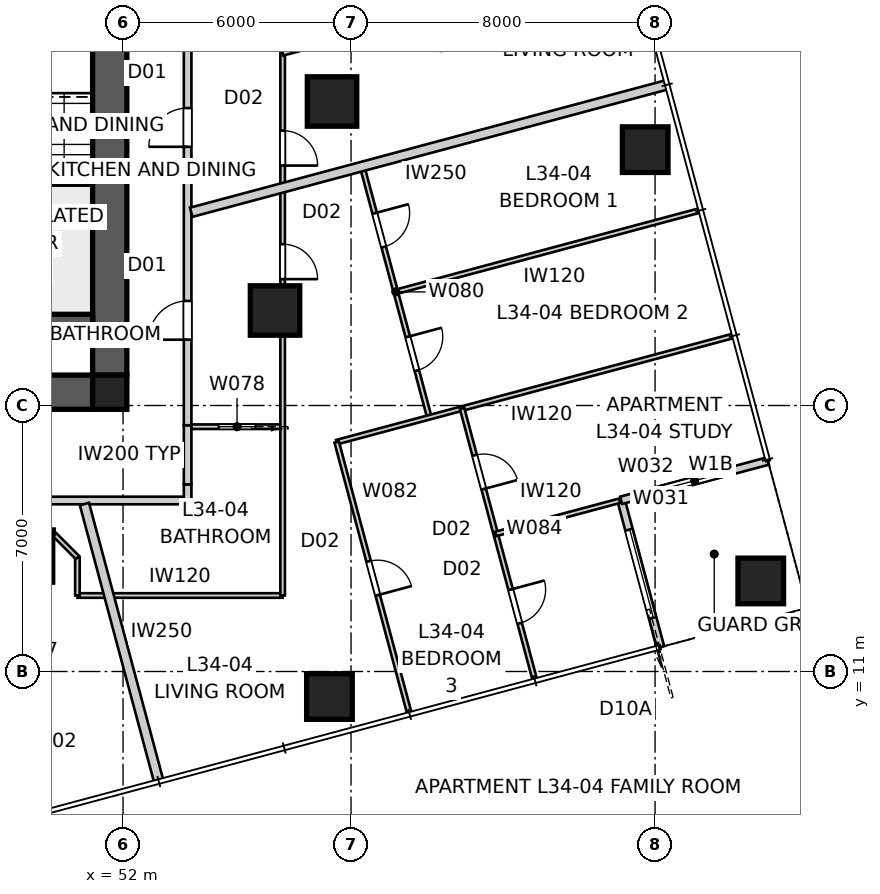
"""IFC4 building model, lengths in metres.
Left out: names, types, materials, properties, quantities, classifications, styles, units other than length and angle.
Written with IfcOpenShell. Run it as: python <this file> out.ifc"""

import sys

from ifc_helpers import new_model, si_unit, direction, frame, frame_2d, origin, origin_2d, place, context, subcontext, project, spatial, polyline, rectangle, outline, extrude, element, fill, save


model = new_model("IFC4")
c1 = context("Model", 3, precision=1e-05, world=origin(), true_north=direction((0.0, 1.0)))
c2 = subcontext(c1, "Body", "Model", "MODEL_VIEW")
j1 = project(units=[si_unit("LENGTHUNIT", "METRE"), si_unit("PLANEANGLEUNIT", "RADIAN")], contexts=[c1])
p1 = place(None, origin())
s1 = spatial("IfcSite", under=j1, at=p1, CompositionType="ELEMENT")
p2 = place(p1, origin())
s2 = spatial("IfcBuilding", under=s1, at=p2, CompositionType="ELEMENT")
p3 = place(p2, frame((0.0, 0.0, 125.2)))
s3 = spatial("IfcBuildingStorey", under=s2, at=p3, CompositionType="ELEMENT", Elevation=125.2)
p4 = place(p3, frame((51.2, 18.35, 0.0), z_axis=(0.0, 0.0, 1.0), x_axis=(-1.0, 0.0, 0.0)))
e1 = element("IfcWall", 1, at=p4, inside=s3, PredefinedType="SHEAR", context=c2, shape_type="SweptSolid", body=[
    extrude(outline(polyline([(0.0, -0.45), (22.4, -0.45), (22.4, -0.025), (22.85, -0.025), (22.85, 0.025), (22.4, 0.025), (22.4, 0.45), (0.0, 0.45), (0.0, 0.025), (-0.45, 0.025), (-0.45, -0.025), (0.0, -0.025), (0.0, -0.45)])), origin(), (0.0, 0.0, 1.0), 3.4),
])
p5 = place(p3, frame((51.65, 18.8, 0.0), z_axis=(0.0, 0.0, 1.0), x_axis=(0.0, 1.0, 0.0)))
e2 = element("IfcWall", 2, at=p5, inside=s3, PredefinedType="SHEAR", context=c2, shape_type="SweptSolid", body=[
    extrude(outline(polyline([(0.0, -0.45), (22.4, -0.45), (22.4, -0.025), (22.85, -0.025), (22.85, 0.025), (22.4, 0.025), (22.4, 0.45), (0.0, 0.45), (0.0, 0.025), (-0.45, 0.025), (-0.45, -0.025), (0.0, -0.025), (0.0, -0.45)])), origin(), (0.0, 0.0, 1.0), 3.4),
])
p6 = place(p5, frame((11.14, 0.0, 0.0)))
e3 = element("IfcOpeningElement", 3, at=p6, cuts=e2, PredefinedType="OPENING", context=c2, shape_type="SweptSolid", body=[
    extrude(rectangle(XDim=1.02, YDim=2.4, at=frame_2d((0.51, 1.2))), frame((0.0, 0.46, 0.0), z_axis=(0.0, -1.0, 0.0), x_axis=(1.0, 0.0, 0.0)), (0.0, 0.0, 1.0), 0.92),
])
p7 = place(p3, frame((51.2, 20.25, 0.0), z_axis=(0.0, 0.0, 1.0), x_axis=(-1.0, 0.0, 0.0)))
e4 = element("IfcWall", 4, at=p7, inside=s3, PredefinedType="SHEAR", context=c2, shape_type="SweptSolid", body=[
    extrude(rectangle(XDim=3.5, YDim=0.3, at=frame_2d((1.75, 0.0))), origin(), (0.0, 0.0, 1.0), 3.4),
])
p8 = place(p3, frame((51.65, 18.35, 0.0), z_axis=(0.0, 0.0, 1.0), x_axis=(1.0, 0.0, 0.0)))
e5 = element("IfcColumn", 5, at=p8, inside=s3, PredefinedType="COLUMN", context=c2, shape_type="SweptSolid", body=[
    extrude(rectangle(XDim=0.9, YDim=0.9, at=origin_2d()), origin(), (0.0, 0.0, 1.0), 3.4),
])
for number, where, z_axis, x_axis in (
    (6, (57.432, 10.342, 0.0), (0.0, 0.0, 1.0), (1.0, 0.0, 0.0)),
    (7, (68.781, 13.383, 0.0), (0.0, 0.0, 1.0), (1.0, 0.0, 0.0)),
    (8, (65.74, 24.733, 0.0), (0.0, 0.0, 1.0), (1.0, 0.0, 0.0)),
):
    element("IfcColumn", number, at=place(p3, frame(where, z_axis=z_axis, x_axis=x_axis)), inside=s3, PredefinedType="COLUMN", context=c2, shape_type="SweptSolid", body=[
        extrude(rectangle(XDim=1.2, YDim=1.2, at=origin_2d()), origin(), (0.0, 0.0, 1.0), 3.4),
    ])
for number, where, z_axis, x_axis in (
    (9, (57.5, 26.0, 0.0), (0.0, 0.0, 1.0), (1.0, 0.0, 0.0)),
    (10, (49.5, 14.0, 0.0), (0.0, 0.0, 1.0), (1.0, 0.0, 0.0)),
    (11, (56.0, 20.5, 0.0), (0.0, 0.0, 1.0), (1.0, 0.0, 0.0)),
):
    element("IfcColumn", number, at=place(p3, frame(where, z_axis=z_axis, x_axis=x_axis)), inside=s3, PredefinedType="COLUMN", context=c2, shape_type="SweptSolid", body=[
        extrude(rectangle(XDim=1.3, YDim=1.3, at=origin_2d()), origin(), (0.0, 0.0, 1.0), 3.4),
    ])
p9 = place(p3, frame((66.143, 11.641, 0.0), z_axis=(0.0, 0.0, 1.0), x_axis=(-0.258843877716, 0.965919172068, 0.0)))
e12 = element("IfcWall", 12, at=p9, inside=s3, PredefinedType="SOLIDWALL", context=c2, shape_type="SweptSolid", body=[
    extrude(rectangle(XDim=4.0, YDim=0.2, at=frame_2d((2.0, 0.0))), origin(), (0.0, 0.0, 1.0), 3.25),
])
p10 = place(p9, frame((0.8, 0.0, 0.0)))
e13 = element("IfcOpeningElement", 13, at=p10, cuts=e12, PredefinedType="OPENING", context=c2, shape_type="SweptSolid", body=[
    extrude(rectangle(XDim=2.4, YDim=2.1, at=frame_2d((1.2, 1.05))), frame((0.0, 0.11, 0.0), z_axis=(0.0, -1.0, 0.0), x_axis=(1.0, 0.0, 0.0)), (0.0, 0.0, 1.0), 0.22),
])
p11 = place(p3, frame((65.107, 15.504, 0.0), z_axis=(0.0, 0.0, 1.0), x_axis=(0.965934430412, 0.258786931944, 0.0)))
e14 = element("IfcWall", 14, at=p11, inside=s3, PredefinedType="SOLIDWALL", context=c2, shape_type="SweptSolid", body=[
    extrude(rectangle(XDim=4.0, YDim=0.2, at=frame_2d((2.0, 0.0))), origin(), (0.0, 0.0, 1.0), 3.25),
])
p12 = place(p11, frame((1.0, 0.0, 0.45)))
e15 = element("IfcOpeningElement", 15, at=p12, cuts=e14, PredefinedType="OPENING", context=c2, shape_type="SweptSolid", body=[
    extrude(rectangle(XDim=2.0, YDim=1.8, at=frame_2d((1.0, 0.9))), frame((0.0, 0.11, 0.0), z_axis=(0.0, -1.0, 0.0), x_axis=(1.0, 0.0, 0.0)), (0.0, 0.0, 1.0), 0.22),
])
p13 = place(p3, frame((25.5, 15.5, 0.0), z_axis=(0.0, 0.0, 1.0), x_axis=(1.0, 0.0, 0.0)))
e16 = element("IfcWall", 16, at=p13, inside=s3, PredefinedType="PARTITIONING", context=c2, shape_type="SweptSolid", body=[
    extrude(rectangle(XDim=28.2, YDim=0.2, at=frame_2d((14.1, 0.0))), origin(), (0.0, 0.0, 1.0), 3.25),
])
p14 = place(p13, frame((2.244, 0.0, 0.0)))
e17 = element("IfcOpeningElement", 17, at=p14, cuts=e16, PredefinedType="OPENING", context=c2, shape_type="SweptSolid", body=[
    extrude(rectangle(XDim=1.02, YDim=2.1, at=frame_2d((0.51, 1.05))), frame((0.0, 0.11, 0.0), z_axis=(0.0, -1.0, 0.0), x_axis=(1.0, 0.0, 0.0)), (0.0, 0.0, 1.0), 0.22),
])
p15 = place(p13, frame((9.542, 0.0, 0.0)))
e18 = element("IfcOpeningElement", 18, at=p15, cuts=e16, PredefinedType="OPENING", context=c2, shape_type="SweptSolid", body=[
    extrude(rectangle(XDim=1.02, YDim=2.34, at=frame_2d((0.51, 1.17))), frame((0.0, 0.11, 0.0), z_axis=(0.0, -1.0, 0.0), x_axis=(1.0, 0.0, 0.0)), (0.0, 0.0, 1.0), 0.22),
])
p16 = place(p13, frame((21.994, 0.0, 0.0)))
e19 = element("IfcOpeningElement", 19, at=p16, cuts=e16, PredefinedType="OPENING", context=c2, shape_type="SweptSolid", body=[
    extrude(rectangle(XDim=1.02, YDim=2.34, at=frame_2d((0.51, 1.17))), frame((0.0, 0.11, 0.0), z_axis=(0.0, -1.0, 0.0), x_axis=(1.0, 0.0, 0.0)), (0.0, 0.0, 1.0), 0.22),
])
p17 = place(p3, frame((53.7, 15.5, 0.0), z_axis=(0.0, 0.0, 1.0), x_axis=(0.0, 1.0, 0.0)))
e20 = element("IfcWall", 20, at=p17, inside=s3, PredefinedType="PARTITIONING", context=c2, shape_type="SweptSolid", body=[
    extrude(rectangle(XDim=0.426, YDim=0.2, at=frame_2d((0.213, 0.0))), origin(), (0.0, 0.0, 1.0), 3.25),
])
p18 = place(p3, frame((53.7, 15.926, 0.0), z_axis=(0.0, 0.0, 1.0), x_axis=(0.0, 1.0, 0.0)))
e21 = element("IfcWall", 21, at=p18, inside=s3, PredefinedType="PARTITIONING", context=c2, shape_type="SweptSolid", body=[
    extrude(rectangle(XDim=1.554, YDim=0.2, at=frame_2d((0.777, 0.0))), origin(), (0.0, 0.0, 1.0), 2.722),
])
p19 = place(p3, frame((53.7, 17.48, 0.0), z_axis=(0.0, 0.0, 1.0), x_axis=(0.0, 1.0, 0.0)))
e22 = element("IfcWall", 22, at=p19, inside=s3, PredefinedType="PARTITIONING", context=c2, shape_type="SweptSolid", body=[
    extrude(rectangle(XDim=26.22, YDim=0.2, at=frame_2d((13.11, 0.0))), origin(), (0.0, 0.0, 1.0), 3.25),
])
p20 = place(p19, frame((2.252, 0.0, 0.0)))
e23 = element("IfcOpeningElement", 23, at=p20, cuts=e22, PredefinedType="OPENING", context=c2, shape_type="SweptSolid", body=[
    extrude(rectangle(XDim=1.02, YDim=2.34, at=frame_2d((0.51, 1.17))), frame((0.0, 0.11, 0.0), z_axis=(0.0, -1.0, 0.0), x_axis=(1.0, 0.0, 0.0)), (0.0, 0.0, 1.0), 0.22),
])
p21 = place(p19, frame((7.328, 0.0, 0.0)))
e24 = element("IfcOpeningElement", 24, at=p21, cuts=e22, PredefinedType="OPENING", context=c2, shape_type="SweptSolid", body=[
    extrude(rectangle(XDim=1.02, YDim=2.34, at=frame_2d((0.51, 1.17))), frame((0.0, 0.11, 0.0), z_axis=(0.0, -1.0, 0.0), x_axis=(1.0, 0.0, 0.0)), (0.0, 0.0, 1.0), 0.22),
])
p22 = place(p3, frame((52.942, 8.104, 0.0), z_axis=(0.0, 0.0, 1.0), x_axis=(-0.258822171171, 0.965924988656, 0.0)))
e25 = element("IfcWall", 25, at=p22, inside=s3, PredefinedType="PARTITIONING", context=c2, shape_type="SweptSolid", body=[
    extrude(rectangle(XDim=7.56, YDim=0.25, at=frame_2d((3.78, 0.0))), origin(), (0.0, 0.0, 1.0), 3.25),
])
p23 = place(p3, frame((66.318, 26.44, 0.0), z_axis=(0.0, 0.0, 1.0), x_axis=(-0.965924854576, -0.258822671559, 0.0)))
e26 = element("IfcWall", 26, at=p23, inside=s3, PredefinedType="PARTITIONING", context=c2, shape_type="SweptSolid", body=[
    extrude(rectangle(XDim=12.966, YDim=0.25, at=frame_2d((6.483, 0.0))), origin(), (0.0, 0.0, 1.0), 3.25),
])
p24 = place(p3, frame((56.2, 13.0, 0.0), z_axis=(0.0, 0.0, 1.0), x_axis=(-1.0, 0.0, 0.0)))
e27 = element("IfcWall", 27, at=p24, inside=s3, PredefinedType="PARTITIONING", context=c2, shape_type="SweptSolid", body=[
    extrude(rectangle(XDim=5.4, YDim=0.12, at=frame_2d((2.7, 0.0))), origin(), (0.0, 0.0, 1.0), 3.25),
])
p25 = place(p3, frame((50.8, 13.0, 0.0), z_axis=(0.0, 0.0, 1.0), x_axis=(0.0, 1.0, 0.0)))
e28 = element("IfcWall", 28, at=p25, inside=s3, PredefinedType="PARTITIONING", context=c2, shape_type="SweptSolid", body=[
    extrude(rectangle(XDim=1.0, YDim=0.12, at=frame_2d((0.5, 0.0))), origin(), (0.0, 0.0, 1.0), 3.25),
])
p26 = place(p3, frame((50.8, 14.0, 0.0), z_axis=(0.0, 0.0, 1.0), x_axis=(-0.707106781187, 0.707106781187, 0.0)))
e29 = element("IfcWall", 29, at=p26, inside=s3, PredefinedType="PARTITIONING", context=c2, shape_type="SweptSolid", body=[
    extrude(rectangle(XDim=0.849, YDim=0.12, at=frame_2d((0.424, 0.0))), origin(), (0.0, 0.0, 1.0), 3.25),
])
p27 = place(p3, frame((50.2, 14.7, 0.0), z_axis=(0.0, 0.0, 1.0), x_axis=(-1.0, 0.0, 0.0)))
e30 = element("IfcWall", 30, at=p27, inside=s3, PredefinedType="PARTITIONING", context=c2, shape_type="SweptSolid", body=[
    extrude(rectangle(XDim=1.4, YDim=0.12, at=frame_2d((0.7, 0.0))), origin(), (0.0, 0.0, 1.0), 3.25),
])
p28 = place(p3, frame((56.2, 17.442, 0.0), z_axis=(0.0, 0.0, 1.0), x_axis=(-1.0, 0.0, 0.0)))
e31 = element("IfcWall", 31, at=p28, inside=s3, PredefinedType="PARTITIONING", context=c2, shape_type="SweptSolid", body=[
    extrude(rectangle(XDim=2.4, YDim=0.12, at=frame_2d((1.2, 0.0))), origin(), (0.0, 0.0, 1.0), 3.25),
])
p29 = place(p28, frame((0.72, 0.0, 0.0)))
e32 = element("IfcOpeningElement", 32, at=p29, cuts=e31, PredefinedType="OPENING", context=c2, shape_type="SweptSolid", body=[
    extrude(rectangle(XDim=0.96, YDim=2.1, at=frame_2d((0.48, 1.05))), frame((0.0, 0.07, 0.0), z_axis=(0.0, -1.0, 0.0), x_axis=(1.0, 0.0, 0.0)), (0.0, 0.0, 1.0), 0.14),
])
p30 = place(p3, frame((56.2, 46.2, 0.0), z_axis=(0.0, 0.0, 1.0), x_axis=(0.0, -1.0, 0.0)))
e33 = element("IfcWall", 33, at=p30, inside=s3, PredefinedType="PARTITIONING", context=c2, shape_type="SweptSolid", body=[
    extrude(rectangle(XDim=33.2, YDim=0.12, at=frame_2d((16.6, 0.0))), origin(), (0.0, 0.0, 1.0), 2.55),
])
p31 = place(p30, frame((23.955, 0.0, 0.0)))
e34 = element("IfcOpeningElement", 34, at=p31, cuts=e33, PredefinedType="OPENING", context=c2, shape_type="SweptSolid", body=[
    extrude(rectangle(XDim=0.92, YDim=2.34, at=frame_2d((0.46, 1.17))), frame((0.0, 0.07, 0.0), z_axis=(0.0, -1.0, 0.0), x_axis=(1.0, 0.0, 0.0)), (0.0, 0.0, 1.0), 0.14),
])
p32 = place(p30, frame((20.966, 0.0, 0.0)))
e35 = element("IfcOpeningElement", 35, at=p32, cuts=e33, PredefinedType="OPENING", context=c2, shape_type="SweptSolid", body=[
    extrude(rectangle(XDim=0.92, YDim=2.34, at=frame_2d((0.46, 1.17))), frame((0.0, 0.07, 0.0), z_axis=(0.0, -1.0, 0.0), x_axis=(1.0, 0.0, 0.0)), (0.0, 0.0, 1.0), 0.14),
])
p33 = place(p30, frame((13.174, 0.0, 0.0)))
e36 = element("IfcOpeningElement", 36, at=p33, cuts=e33, PredefinedType="OPENING", context=c2, shape_type="SweptSolid", body=[
    extrude(rectangle(XDim=0.96, YDim=2.1, at=frame_2d((0.48, 1.05))), frame((0.0, 0.07, 0.0), z_axis=(0.0, -1.0, 0.0), x_axis=(1.0, 0.0, 0.0)), (0.0, 0.0, 1.0), 0.14),
])
p34 = place(p3, frame((58.292, 24.29, 0.0), z_axis=(0.0, 0.0, 1.0), x_axis=(0.258809899302, -0.965928276853, 0.0)))
e37 = element("IfcWall", 37, at=p34, inside=s3, PredefinedType="PARTITIONING", context=c2, shape_type="SweptSolid", body=[
    extrude(rectangle(XDim=6.833, YDim=0.12, at=frame_2d((3.417, 0.0))), origin(), (0.0, 0.0, 1.0), 3.25),
])
p35 = place(p34, frame((1.273, 0.0, 0.0)))
e38 = element("IfcOpeningElement", 38, at=p35, cuts=e37, PredefinedType="OPENING", context=c2, shape_type="SweptSolid", body=[
    extrude(rectangle(XDim=0.92, YDim=2.34, at=frame_2d((0.46, 1.17))), frame((0.0, 0.07, 0.0), z_axis=(0.0, -1.0, 0.0), x_axis=(1.0, 0.0, 0.0)), (0.0, 0.0, 1.0), 0.14),
])
p36 = place(p34, frame((4.64, 0.0, 0.0)))
e39 = element("IfcOpeningElement", 39, at=p36, cuts=e37, PredefinedType="OPENING", context=c2, shape_type="SweptSolid", body=[
    extrude(rectangle(XDim=0.92, YDim=2.34, at=frame_2d((0.46, 1.17))), frame((0.0, 0.07, 0.0), z_axis=(0.0, -1.0, 0.0), x_axis=(1.0, 0.0, 0.0)), (0.0, 0.0, 1.0), 0.14),
])
p37 = place(p3, frame((68.048, 19.83, 0.0), z_axis=(0.0, 0.0, 1.0), x_axis=(-0.965921496576, -0.258835203272, 0.0)))
e40 = element("IfcWall", 40, at=p37, inside=s3, PredefinedType="PARTITIONING", context=c2, shape_type="SweptSolid", body=[
    extrude(rectangle(XDim=10.793, YDim=0.12, at=frame_2d((5.397, 0.0))), origin(), (0.0, 0.0, 1.0), 3.25),
])
p38 = place(p3, frame((57.623, 17.036, 0.0), z_axis=(0.0, 0.0, 1.0), x_axis=(0.258816044185, -0.965926630377, 0.0)))
e41 = element("IfcWall", 41, at=p38, inside=s3, PredefinedType="PARTITIONING", context=c2, shape_type="SweptSolid", body=[
    extrude(rectangle(XDim=7.377, YDim=0.12, at=frame_2d((3.688, 0.0))), origin(), (0.0, 0.0, 1.0), 2.638),
])
p39 = place(p38, frame((3.248, 0.0, 0.0)))
e42 = element("IfcOpeningElement", 42, at=p39, cuts=e41, PredefinedType="OPENING", context=c2, shape_type="SweptSolid", body=[
    extrude(rectangle(XDim=0.92, YDim=2.34, at=frame_2d((0.46, 1.17))), frame((0.0, 0.07, 0.0), z_axis=(0.0, -1.0, 0.0), x_axis=(1.0, 0.0, 0.0)), (0.0, 0.0, 1.0), 0.14),
])
p40 = place(p3, frame((67.164, 23.13, 0.0), z_axis=(0.0, 0.0, 1.0), x_axis=(-0.965929470378, -0.258805444794, 0.0)))
e43 = element("IfcWall", 43, at=p40, inside=s3, PredefinedType="PARTITIONING", context=c2, shape_type="SweptSolid", body=[
    extrude(rectangle(XDim=8.269, YDim=0.12, at=frame_2d((4.135, 0.0))), origin(), (0.0, 0.0, 1.0), 2.722),
])
p41 = place(p3, frame((60.923, 17.92, 0.0), z_axis=(0.0, 0.0, 1.0), x_axis=(0.258846923464, -0.965918355874, 0.0)))
e44 = element("IfcWall", 44, at=p41, inside=s3, PredefinedType="PARTITIONING", context=c2, shape_type="SweptSolid", body=[
    extrude(rectangle(XDim=7.377, YDim=0.12, at=frame_2d((3.688, 0.0))), origin(), (0.0, 0.0, 1.0), 3.25),
])
p42 = place(p41, frame((4.932, 0.0, 0.0)))
e45 = element("IfcOpeningElement", 45, at=p42, cuts=e44, PredefinedType="OPENING", context=c2, shape_type="SweptSolid", body=[
    extrude(rectangle(XDim=0.92, YDim=2.34, at=frame_2d((0.46, 1.17))), frame((0.0, 0.07, 0.0), z_axis=(0.0, -1.0, 0.0), x_axis=(1.0, 0.0, 0.0)), (0.0, 0.0, 1.0), 0.14),
])
p43 = place(p41, frame((1.273, 0.0, 0.0)))
e46 = element("IfcOpeningElement", 46, at=p43, cuts=e44, PredefinedType="OPENING", context=c2, shape_type="SweptSolid", body=[
    extrude(rectangle(XDim=0.92, YDim=2.34, at=frame_2d((0.46, 1.17))), frame((0.0, 0.07, 0.0), z_axis=(0.0, -1.0, 0.0), x_axis=(1.0, 0.0, 0.0)), (0.0, 0.0, 1.0), 0.14),
])
p44 = place(p3, frame((65.069, 15.494, 0.0), z_axis=(0.0, 0.0, 1.0), x_axis=(-0.96593546512, -0.258783069815, 0.0)))
e47 = element("IfcWall", 47, at=p44, inside=s3, PredefinedType="PARTITIONING", context=c2, shape_type="SweptSolid", body=[
    extrude(rectangle(XDim=3.376, YDim=0.12, at=frame_2d((1.688, 0.0))), origin(), (0.0, 0.0, 1.0), 3.25),
])
p45 = place(p3, frame((56.2, 27.266, 0.0), z_axis=(0.0, 0.0, 1.0), x_axis=(0.965926072385, 0.25881812666, 0.0)))
e48 = element("IfcWall", 48, at=p45, inside=s3, PredefinedType="PARTITIONING", context=c2, shape_type="SweptSolid", body=[
    extrude(rectangle(XDim=9.52, YDim=0.12, at=frame_2d((4.76, 0.0))), origin(), (0.0, 0.0, 1.0), 3.25),
])
p46 = place(p45, frame((4.32, 0.0, 0.0)))
e49 = element("IfcOpeningElement", 49, at=p46, cuts=e48, PredefinedType="OPENING", context=c2, shape_type="SweptSolid", body=[
    extrude(rectangle(XDim=0.92, YDim=2.34, at=frame_2d((0.46, 1.17))), frame((0.0, 0.07, 0.0), z_axis=(0.0, -1.0, 0.0), x_axis=(1.0, 0.0, 0.0)), (0.0, 0.0, 1.0), 0.14),
])
p47 = place(p10, origin())
e50 = element("IfcDoor", 50, at=p47, inside=s3, OperationType="SLIDING_TO_LEFT", PredefinedType="DOOR", context=c2, shape_type="SweptSolid", body=[
    extrude(rectangle(XDim=2.4, YDim=2.1, at=frame_2d((1.2, 1.05))), frame((0.0, 0.025, 0.0), z_axis=(0.0, -1.0, 0.0), x_axis=(1.0, 0.0, 0.0)), (0.0, 0.0, 1.0), 0.05),
])
fill(e13, e50)
p48 = place(p12, origin())
e51 = element("IfcWindow", 51, at=p48, inside=s3, PartitioningType="SINGLE_PANEL", PredefinedType="WINDOW", context=c2, shape_type="SweptSolid", body=[
    extrude(rectangle(XDim=2.0, YDim=1.8, at=frame_2d((1.0, 0.9))), frame((0.0, 0.03, 0.0), z_axis=(0.0, -1.0, 0.0), x_axis=(1.0, 0.0, 0.0)), (0.0, 0.0, 1.0), 0.06),
])
fill(e15, e51)
p49 = place(p20, origin())
e52 = element("IfcDoor", 52, at=p49, inside=s3, OperationType="SINGLE_SWING_LEFT", PredefinedType="DOOR", context=c2, shape_type="SweptSolid", body=[
    extrude(rectangle(XDim=1.02, YDim=2.34, at=frame_2d((0.51, 1.17))), frame((0.0, 0.025, 0.0), z_axis=(0.0, -1.0, 0.0), x_axis=(1.0, 0.0, 0.0)), (0.0, 0.0, 1.0), 0.05),
])
fill(e23, e52)
p50 = place(p21, origin())
e53 = element("IfcDoor", 53, at=p50, inside=s3, OperationType="SINGLE_SWING_LEFT", PredefinedType="DOOR", context=c2, shape_type="SweptSolid", body=[
    extrude(rectangle(XDim=1.02, YDim=2.34, at=frame_2d((0.51, 1.17))), frame((0.0, 0.025, 0.0), z_axis=(0.0, -1.0, 0.0), x_axis=(1.0, 0.0, 0.0)), (0.0, 0.0, 1.0), 0.05),
])
fill(e24, e53)
p51 = place(p31, origin())
e54 = element("IfcDoor", 54, at=p51, inside=s3, OperationType="SINGLE_SWING_RIGHT", PredefinedType="DOOR", context=c2, shape_type="SweptSolid", body=[
    extrude(rectangle(XDim=0.92, YDim=2.34, at=frame_2d((0.46, 1.17))), frame((0.0, 0.025, 0.0), z_axis=(0.0, -1.0, 0.0), x_axis=(1.0, 0.0, 0.0)), (0.0, 0.0, 1.0), 0.05),
])
fill(e34, e54)
p52 = place(p29, origin())
e55 = element("IfcDoor", 55, at=p52, inside=s3, OperationType="SLIDING_TO_LEFT", PredefinedType="DOOR", context=c2, shape_type="SweptSolid", body=[
    extrude(rectangle(XDim=0.96, YDim=2.1, at=frame_2d((0.48, 1.05))), frame((0.0, 0.025, 0.0), z_axis=(0.0, -1.0, 0.0), x_axis=(1.0, 0.0, 0.0)), (0.0, 0.0, 1.0), 0.05),
])
fill(e32, e55)
p53 = place(p32, origin())
e56 = element("IfcDoor", 56, at=p53, inside=s3, OperationType="SINGLE_SWING_RIGHT", PredefinedType="DOOR", context=c2, shape_type="SweptSolid", body=[
    extrude(rectangle(XDim=0.92, YDim=2.34, at=frame_2d((0.46, 1.17))), frame((0.0, 0.025, 0.0), z_axis=(0.0, -1.0, 0.0), x_axis=(1.0, 0.0, 0.0)), (0.0, 0.0, 1.0), 0.05),
])
fill(e35, e56)
p54 = place(p39, origin())
e57 = element("IfcDoor", 57, at=p54, inside=s3, OperationType="SINGLE_SWING_RIGHT", PredefinedType="DOOR", context=c2, shape_type="SweptSolid", body=[
    extrude(rectangle(XDim=0.92, YDim=2.34, at=frame_2d((0.46, 1.17))), frame((0.0, 0.025, 0.0), z_axis=(0.0, -1.0, 0.0), x_axis=(1.0, 0.0, 0.0)), (0.0, 0.0, 1.0), 0.05),
])
fill(e42, e57)
p55 = place(p35, origin())
e58 = element("IfcDoor", 58, at=p55, inside=s3, OperationType="SINGLE_SWING_LEFT", PredefinedType="DOOR", context=c2, shape_type="SweptSolid", body=[
    extrude(rectangle(XDim=0.92, YDim=2.34, at=frame_2d((0.46, 1.17))), frame((0.0, 0.025, 0.0), z_axis=(0.0, -1.0, 0.0), x_axis=(1.0, 0.0, 0.0)), (0.0, 0.0, 1.0), 0.05),
])
fill(e38, e58)
p56 = place(p36, origin())
e59 = element("IfcDoor", 59, at=p56, inside=s3, OperationType="SINGLE_SWING_LEFT", PredefinedType="DOOR", context=c2, shape_type="SweptSolid", body=[
    extrude(rectangle(XDim=0.92, YDim=2.34, at=frame_2d((0.46, 1.17))), frame((0.0, 0.025, 0.0), z_axis=(0.0, -1.0, 0.0), x_axis=(1.0, 0.0, 0.0)), (0.0, 0.0, 1.0), 0.05),
])
fill(e39, e59)
p57 = place(p42, origin())
e60 = element("IfcDoor", 60, at=p57, inside=s3, OperationType="SINGLE_SWING_LEFT", PredefinedType="DOOR", context=c2, shape_type="SweptSolid", body=[
    extrude(rectangle(XDim=0.92, YDim=2.34, at=frame_2d((0.46, 1.17))), frame((0.0, 0.025, 0.0), z_axis=(0.0, -1.0, 0.0), x_axis=(1.0, 0.0, 0.0)), (0.0, 0.0, 1.0), 0.05),
])
fill(e45, e60)
p58 = place(p43, origin())
e61 = element("IfcDoor", 61, at=p58, inside=s3, OperationType="SINGLE_SWING_RIGHT", PredefinedType="DOOR", context=c2, shape_type="SweptSolid", body=[
    extrude(rectangle(XDim=0.92, YDim=2.34, at=frame_2d((0.46, 1.17))), frame((0.0, 0.025, 0.0), z_axis=(0.0, -1.0, 0.0), x_axis=(1.0, 0.0, 0.0)), (0.0, 0.0, 1.0), 0.05),
])
fill(e46, e61)
save(model, sys.argv[1])
